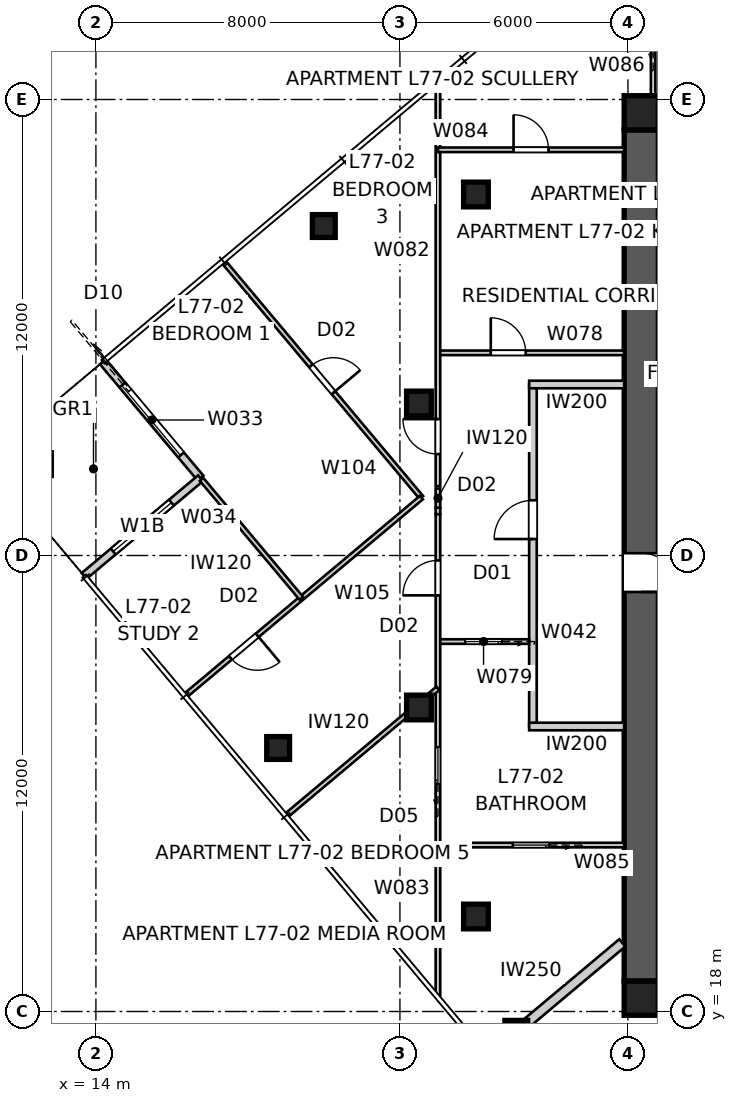
"""IFC4 building model, lengths in metres.
Left out: names, types, materials, properties, quantities, classifications, styles, units other than length and angle.
Written with IfcOpenShell. Run it as: python <this file> out.ifc"""

import sys

from ifc_helpers import new_model, si_unit, direction, frame, frame_2d, origin, origin_2d, place, context, subcontext, project, spatial, polyline, rectangle, outline, extrude, element, fill, save


model = new_model("IFC4")
c1 = context("Model", 3, precision=1e-05, world=origin(), true_north=direction((0.0, 1.0)))
c2 = subcontext(c1, "Body", "Model", "MODEL_VIEW")
j1 = project(units=[si_unit("LENGTHUNIT", "METRE"), si_unit("PLANEANGLEUNIT", "RADIAN")], contexts=[c1])
p1 = place(None, origin())
s1 = spatial("IfcSite", under=j1, at=p1, CompositionType="ELEMENT")
p2 = place(p1, origin())
s2 = spatial("IfcBuilding", under=s1, at=p2, CompositionType="ELEMENT")
p3 = place(p2, frame((0.0, 0.0, 279.4)))
s3 = spatial("IfcBuildingStorey", under=s2, at=p3, CompositionType="ELEMENT", Elevation=279.4)
for number, where, z_axis, x_axis in (
    (1, (28.8, 41.65, 0.0), (0.0, 0.0, 1.0), (1.0, 0.0, 0.0)),
    (2, (51.2, 18.35, 0.0), (0.0, 0.0, 1.0), (-1.0, 0.0, 0.0)),
):
    element("IfcWall", number, at=place(p3, frame(where, z_axis=z_axis, x_axis=x_axis)), inside=s3, PredefinedType="SHEAR", context=c2, shape_type="SweptSolid", body=[
        extrude(outline(polyline([(0.0, -0.45), (22.4, -0.45), (22.4, -0.025), (22.85, -0.025), (22.85, 0.025), (22.4, 0.025), (22.4, 0.45), (0.0, 0.45), (0.0, 0.025), (-0.45, 0.025), (-0.45, -0.025), (0.0, -0.025), (0.0, -0.45)])), origin(), (0.0, 0.0, 1.0), 3.4),
    ])
p4 = place(p3, frame((28.35, 41.2, 0.0), z_axis=(0.0, 0.0, 1.0), x_axis=(0.0, -1.0, 0.0)))
e3 = element("IfcWall", 3, at=p4, inside=s3, PredefinedType="SHEAR", context=c2, shape_type="SweptSolid", body=[
    extrude(outline(polyline([(0.0, -0.45), (22.4, -0.45), (22.4, -0.025), (22.85, -0.025), (22.85, 0.025), (22.4, 0.025), (22.4, 0.45), (0.0, 0.45), (0.0, 0.025), (-0.45, 0.025), (-0.45, -0.025), (0.0, -0.025), (0.0, -0.45)])), origin(), (0.0, 0.0, 1.0), 3.4),
])
p5 = place(p4, frame((11.14, 0.0, 0.0)))
e4 = element("IfcOpeningElement", 4, at=p5, cuts=e3, PredefinedType="OPENING", context=c2, shape_type="SweptSolid", body=[
    extrude(rectangle(XDim=1.02, YDim=2.4, at=frame_2d((0.51, 1.2))), frame((0.0, 0.46, 0.0), z_axis=(0.0, -1.0, 0.0), x_axis=(1.0, 0.0, 0.0)), (0.0, 0.0, 1.0), 0.92),
])
for number, where, z_axis, x_axis in (
    (5, (28.35, 18.35, 0.0), (0.0, 0.0, 1.0), (1.0, 0.0, 0.0)),
    (6, (28.35, 41.65, 0.0), (0.0, 0.0, 1.0), (1.0, 0.0, 0.0)),
):
    element("IfcColumn", number, at=place(p3, frame(where, z_axis=z_axis, x_axis=x_axis)), inside=s3, PredefinedType="COLUMN", context=c2, shape_type="SweptSolid", body=[
        extrude(rectangle(XDim=0.9, YDim=0.9, at=origin_2d()), origin(), (0.0, 0.0, 1.0), 3.4),
    ])
for number, where, z_axis, x_axis in (
    (7, (19.997, 38.671, 0.0), (0.0, 0.0, 1.0), (1.0, 0.0, 0.0)),
    (8, (18.795, 24.935, 0.0), (0.0, 0.0, 1.0), (1.0, 0.0, 0.0)),
    (9, (25.062, 17.466, 0.0), (0.0, 0.0, 1.0), (1.0, 0.0, 0.0)),
):
    element("IfcColumn", number, at=place(p3, frame(where, z_axis=z_axis, x_axis=x_axis)), inside=s3, PredefinedType="COLUMN", context=c2, shape_type="SweptSolid", body=[
        extrude(rectangle(XDim=0.6, YDim=0.6, at=origin_2d()), origin(), (0.0, 0.0, 1.0), 3.4),
    ])
for number, where, z_axis, x_axis in (
    (10, (24.0, 39.5, 0.0), (0.0, 0.0, 1.0), (1.0, 0.0, 0.0)),
    (11, (22.5, 34.0, 0.0), (0.0, 0.0, 1.0), (1.0, 0.0, 0.0)),
    (12, (22.5, 26.0, 0.0), (0.0, 0.0, 1.0), (1.0, 0.0, 0.0)),
    (13, (24.0, 20.5, 0.0), (0.0, 0.0, 1.0), (1.0, 0.0, 0.0)),
):
    element("IfcColumn", number, at=place(p3, frame(where, z_axis=z_axis, x_axis=x_axis)), inside=s3, PredefinedType="COLUMN", context=c2, shape_type="SweptSolid", body=[
        extrude(rectangle(XDim=0.65, YDim=0.65, at=origin_2d()), origin(), (0.0, 0.0, 1.0), 3.4),
    ])
p6 = place(p3, frame((14.183, 35.098, 0.0), z_axis=(0.0, 0.0, 1.0), x_axis=(0.642768287094, -0.766060656284, 0.0)))
e14 = element("IfcWall", 14, at=p6, inside=s3, PredefinedType="SOLIDWALL", context=c2, shape_type="SweptSolid", body=[
    extrude(rectangle(XDim=4.0, YDim=0.2, at=frame_2d((2.0, 0.0))), origin(), (0.0, 0.0, 1.0), 3.25),
])
p7 = place(p6, frame((0.8, 0.0, 0.0)))
e15 = element("IfcOpeningElement", 15, at=p7, cuts=e14, PredefinedType="OPENING", context=c2, shape_type="SweptSolid", body=[
    extrude(rectangle(XDim=2.4, YDim=2.4, at=frame_2d((1.2, 1.2))), frame((0.0, 0.11, 0.0), z_axis=(0.0, -1.0, 0.0), x_axis=(1.0, 0.0, 0.0)), (0.0, 0.0, 1.0), 0.22),
])
p8 = place(p3, frame((16.754, 32.034, 0.0), z_axis=(0.0, 0.0, 1.0), x_axis=(-0.766035437498, -0.642798342015, 0.0)))
e16 = element("IfcWall", 16, at=p8, inside=s3, PredefinedType="SOLIDWALL", context=c2, shape_type="SweptSolid", body=[
    extrude(rectangle(XDim=4.0, YDim=0.2, at=frame_2d((2.0, 0.0))), origin(), (0.0, 0.0, 1.0), 3.25),
])
p9 = place(p8, frame((1.0, 0.0, 0.45)))
e17 = element("IfcOpeningElement", 17, at=p9, cuts=e16, PredefinedType="OPENING", context=c2, shape_type="SweptSolid", body=[
    extrude(rectangle(XDim=2.0, YDim=1.8, at=frame_2d((1.0, 0.9))), frame((0.0, 0.11, 0.0), z_axis=(0.0, -1.0, 0.0), x_axis=(1.0, 0.0, 0.0)), (0.0, 0.0, 1.0), 0.22),
])
p10 = place(p3, frame((25.5, 25.5, 0.0), z_axis=(0.0, 0.0, 1.0), x_axis=(0.0, 1.0, 0.0)))
e18 = element("IfcWall", 18, at=p10, inside=s3, PredefinedType="PARTITIONING", context=c2, shape_type="SweptSolid", body=[
    extrude(rectangle(XDim=9.0, YDim=0.2, at=frame_2d((4.5, 0.0))), origin(), (0.0, 0.0, 1.0), 3.25),
])
p11 = place(p10, frame((4.933, 0.0, 0.0)))
e19 = element("IfcOpeningElement", 19, at=p11, cuts=e18, PredefinedType="OPENING", context=c2, shape_type="SweptSolid", body=[
    extrude(rectangle(XDim=1.02, YDim=2.34, at=frame_2d((0.51, 1.17))), frame((0.0, 0.11, 0.0), z_axis=(0.0, -1.0, 0.0), x_axis=(1.0, 0.0, 0.0)), (0.0, 0.0, 1.0), 0.22),
])
for number, where, z_axis, x_axis in (
    (20, (27.9, 34.5, 0.0), (0.0, 0.0, 1.0), (-1.0, 0.0, 0.0)),
    (21, (27.9, 25.5, 0.0), (0.0, 0.0, 1.0), (-1.0, 0.0, 0.0)),
):
    element("IfcWall", number, at=place(p3, frame(where, z_axis=z_axis, x_axis=x_axis)), inside=s3, PredefinedType="PARTITIONING", context=c2, shape_type="SweptSolid", body=[
        extrude(rectangle(XDim=2.5, YDim=0.2, at=frame_2d((1.25, 0.0))), origin(), (0.0, 0.0, 1.0), 3.25),
    ])
p12 = place(p3, frame((24.296, 16.823, 0.0), z_axis=(0.0, 0.0, 1.0), x_axis=(0.76603440109, 0.64279957712, 0.0)))
e22 = element("IfcWall", 22, at=p12, inside=s3, PredefinedType="PARTITIONING", context=c2, shape_type="SweptSolid", body=[
    extrude(rectangle(XDim=4.64, YDim=0.25, at=frame_2d((2.32, 0.0))), origin(), (0.0, 0.0, 1.0), 3.25),
])
p13 = place(p3, frame((23.0, 35.333, 0.0), z_axis=(0.0, 0.0, 1.0), x_axis=(1.0, 0.0, 0.0)))
e23 = element("IfcWall", 23, at=p13, inside=s3, PredefinedType="PARTITIONING", context=c2, shape_type="SweptSolid", body=[
    extrude(rectangle(XDim=4.9, YDim=0.12, at=frame_2d((2.45, 0.0))), origin(), (0.0, 0.0, 1.0), 3.25),
])
p14 = place(p13, frame((1.39, 0.0, 0.0)))
e24 = element("IfcOpeningElement", 24, at=p14, cuts=e23, PredefinedType="OPENING", context=c2, shape_type="SweptSolid", body=[
    extrude(rectangle(XDim=0.92, YDim=2.34, at=frame_2d((0.46, 1.17))), frame((0.0, 0.07, 0.0), z_axis=(0.0, -1.0, 0.0), x_axis=(1.0, 0.0, 0.0)), (0.0, 0.0, 1.0), 0.14),
])
p15 = place(p3, frame((25.4, 27.736, 0.0), z_axis=(0.0, 0.0, 1.0), x_axis=(-1.0, 0.0, 0.0)))
e25 = element("IfcWall", 25, at=p15, inside=s3, PredefinedType="PARTITIONING", context=c2, shape_type="SweptSolid", body=[
    extrude(rectangle(XDim=2.4, YDim=0.12, at=frame_2d((1.2, 0.0))), origin(), (0.0, 0.0, 1.0), 3.25),
])
p16 = place(p15, frame((0.72, 0.0, 0.0)))
e26 = element("IfcOpeningElement", 26, at=p16, cuts=e25, PredefinedType="OPENING", context=c2, shape_type="SweptSolid", body=[
    extrude(rectangle(XDim=0.96, YDim=2.1, at=frame_2d((0.48, 1.05))), frame((0.0, 0.07, 0.0), z_axis=(0.0, -1.0, 0.0), x_axis=(1.0, 0.0, 0.0)), (0.0, 0.0, 1.0), 0.14),
])
p17 = place(p3, frame((23.0, 31.258, 0.0), z_axis=(0.0, 0.0, 1.0), x_axis=(0.0, 1.0, 0.0)))
e27 = element("IfcWall", 27, at=p17, inside=s3, PredefinedType="PARTITIONING", context=c2, shape_type="SweptSolid", body=[
    extrude(rectangle(XDim=0.504, YDim=0.12, at=frame_2d((0.252, 0.0))), origin(), (0.0, 0.0, 1.0), 3.25),
])
p18 = place(p3, frame((23.0, 31.824, 0.0), z_axis=(0.0, 0.0, 1.0), x_axis=(0.0, 1.0, 0.0)))
e28 = element("IfcWall", 28, at=p18, inside=s3, PredefinedType="PARTITIONING", context=c2, shape_type="SweptSolid", body=[
    extrude(rectangle(XDim=10.619, YDim=0.12, at=frame_2d((5.31, 0.0))), origin(), (0.0, 0.0, 1.0), 2.55),
])
p19 = place(p18, frame((0.844, 0.0, 0.0)))
e29 = element("IfcOpeningElement", 29, at=p19, cuts=e28, PredefinedType="OPENING", context=c2, shape_type="SweptSolid", body=[
    extrude(rectangle(XDim=0.92, YDim=2.34, at=frame_2d((0.46, 1.17))), frame((0.0, 0.07, 0.0), z_axis=(0.0, -1.0, 0.0), x_axis=(1.0, 0.0, 0.0)), (0.0, 0.0, 1.0), 0.14),
])
p20 = place(p3, frame((23.0, 18.43, 0.0), z_axis=(0.0, 0.0, 1.0), x_axis=(0.0, 1.0, 0.0)))
e30 = element("IfcWall", 30, at=p20, inside=s3, PredefinedType="PARTITIONING", context=c2, shape_type="SweptSolid", body=[
    extrude(rectangle(XDim=12.656, YDim=0.12, at=frame_2d((6.328, 0.0))), origin(), (0.0, 0.0, 1.0), 2.55),
])
p21 = place(p20, frame((10.521, 0.0, 0.0)))
e31 = element("IfcOpeningElement", 31, at=p21, cuts=e30, PredefinedType="OPENING", context=c2, shape_type="SweptSolid", body=[
    extrude(rectangle(XDim=0.92, YDim=2.34, at=frame_2d((0.46, 1.17))), frame((0.0, 0.07, 0.0), z_axis=(0.0, -1.0, 0.0), x_axis=(1.0, 0.0, 0.0)), (0.0, 0.0, 1.0), 0.14),
])
p22 = place(p20, frame((5.565, 0.0, 0.0)))
e32 = element("IfcOpeningElement", 32, at=p22, cuts=e30, PredefinedType="OPENING", context=c2, shape_type="SweptSolid", body=[
    extrude(rectangle(XDim=0.96, YDim=2.1, at=frame_2d((0.48, 1.05))), frame((0.0, 0.07, 0.0), z_axis=(0.0, -1.0, 0.0), x_axis=(1.0, 0.0, 0.0)), (0.0, 0.0, 1.0), 0.14),
])
p23 = place(p3, frame((23.0, 40.676, 0.0), z_axis=(0.0, 0.0, 1.0), x_axis=(1.0, 0.0, 0.0)))
e33 = element("IfcWall", 33, at=p23, inside=s3, PredefinedType="PARTITIONING", context=c2, shape_type="SweptSolid", body=[
    extrude(rectangle(XDim=4.9, YDim=0.12, at=frame_2d((2.45, 0.0))), origin(), (0.0, 0.0, 1.0), 3.25),
])
p24 = place(p23, frame((1.99, 0.0, 0.0)))
e34 = element("IfcOpeningElement", 34, at=p24, cuts=e33, PredefinedType="OPENING", context=c2, shape_type="SweptSolid", body=[
    extrude(rectangle(XDim=0.92, YDim=2.1, at=frame_2d((0.46, 1.05))), frame((0.0, 0.07, 0.0), z_axis=(0.0, -1.0, 0.0), x_axis=(1.0, 0.0, 0.0)), (0.0, 0.0, 1.0), 0.14),
])
p25 = place(p3, frame((27.9, 22.38, 0.0), z_axis=(0.0, 0.0, 1.0), x_axis=(-1.0, 0.0, 0.0)))
e35 = element("IfcWall", 35, at=p25, inside=s3, PredefinedType="PARTITIONING", context=c2, shape_type="SweptSolid", body=[
    extrude(rectangle(XDim=4.9, YDim=0.12, at=frame_2d((2.45, 0.0))), origin(), (0.0, 0.0, 1.0), 3.25),
])
p26 = place(p25, frame((1.97, 0.0, 0.0)))
e36 = element("IfcOpeningElement", 36, at=p26, cuts=e35, PredefinedType="OPENING", context=c2, shape_type="SweptSolid", body=[
    extrude(rectangle(XDim=0.96, YDim=2.1, at=frame_2d((0.48, 1.05))), frame((0.0, 0.07, 0.0), z_axis=(0.0, -1.0, 0.0), x_axis=(1.0, 0.0, 0.0)), (0.0, 0.0, 1.0), 0.14),
])
p27 = place(p3, frame((28.663, 41.18, 0.0), z_axis=(0.0, 0.0, 1.0), x_axis=(0.0, 1.0, 0.0)))
e37 = element("IfcWall", 37, at=p27, inside=s3, PredefinedType="PARTITIONING", context=c2, shape_type="SweptSolid", body=[
    extrude(rectangle(XDim=5.82, YDim=0.12, at=frame_2d((2.91, 0.0))), origin(), (0.0, 0.0, 1.0), 3.25),
])
p28 = place(p27, frame((2.44, 0.0, 0.0)))
e38 = element("IfcOpeningElement", 38, at=p28, cuts=e37, PredefinedType="OPENING", context=c2, shape_type="SweptSolid", body=[
    extrude(rectangle(XDim=0.96, YDim=2.1, at=frame_2d((0.48, 1.05))), frame((0.0, 0.07, 0.0), z_axis=(0.0, -1.0, 0.0), x_axis=(1.0, 0.0, 0.0)), (0.0, 0.0, 1.0), 0.14),
])
p29 = place(p3, frame((17.369, 37.719, 0.0), z_axis=(0.0, 0.0, 1.0), x_axis=(0.642800378028, -0.766033729027, 0.0)))
e39 = element("IfcWall", 39, at=p29, inside=s3, PredefinedType="PARTITIONING", context=c2, shape_type="SweptSolid", body=[
    extrude(rectangle(XDim=8.085, YDim=0.12, at=frame_2d((4.042, 0.0))), origin(), (0.0, 0.0, 1.0), 3.25),
])
p30 = place(p29, frame((3.562, 0.0, 0.0)))
e40 = element("IfcOpeningElement", 40, at=p30, cuts=e39, PredefinedType="OPENING", context=c2, shape_type="SweptSolid", body=[
    extrude(rectangle(XDim=0.92, YDim=2.34, at=frame_2d((0.46, 1.17))), frame((0.0, 0.07, 0.0), z_axis=(0.0, -1.0, 0.0), x_axis=(1.0, 0.0, 0.0)), (0.0, 0.0, 1.0), 0.14),
])
p31 = place(p3, frame((22.566, 31.525, 0.0), z_axis=(0.0, 0.0, 1.0), x_axis=(-0.766033729027, -0.642800378028, 0.0)))
e41 = element("IfcWall", 41, at=p31, inside=s3, PredefinedType="PARTITIONING", context=c2, shape_type="SweptSolid", body=[
    extrude(rectangle(XDim=8.085, YDim=0.12, at=frame_2d((4.042, 0.0))), origin(), (0.0, 0.0, 1.0), 3.25),
])
p32 = place(p31, frame((5.64, 0.0, 0.0)))
e42 = element("IfcOpeningElement", 42, at=p32, cuts=e41, PredefinedType="OPENING", context=c2, shape_type="SweptSolid", body=[
    extrude(rectangle(XDim=0.92, YDim=2.34, at=frame_2d((0.46, 1.17))), frame((0.0, 0.07, 0.0), z_axis=(0.0, -1.0, 0.0), x_axis=(1.0, 0.0, 0.0)), (0.0, 0.0, 1.0), 0.14),
])
p33 = place(p3, frame((19.406, 28.874, 0.0), z_axis=(0.0, 0.0, 1.0), x_axis=(-0.642767300664, 0.766061483953, 0.0)))
e43 = element("IfcWall", 43, at=p33, inside=s3, PredefinedType="PARTITIONING", context=c2, shape_type="SweptSolid", body=[
    extrude(rectangle(XDim=4.085, YDim=0.12, at=frame_2d((2.042, 0.0))), origin(), (0.0, 0.0, 1.0), 3.25),
])
p34 = place(p3, frame((23.0, 26.505, 0.0), z_axis=(0.0, 0.0, 1.0), x_axis=(-0.76605407051, -0.642776136034, 0.0)))
e44 = element("IfcWall", 44, at=p34, inside=s3, PredefinedType="PARTITIONING", context=c2, shape_type="SweptSolid", body=[
    extrude(rectangle(XDim=5.191, YDim=0.12, at=frame_2d((2.595, 0.0))), origin(), (0.0, 0.0, 1.0), 3.25),
])
p35 = place(p3, frame((23.0, 31.258, 0.0), z_axis=(0.0, 0.0, 1.0), x_axis=(0.0, -1.0, 0.0)))
e45 = element("IfcWall", 45, at=p35, inside=s3, PredefinedType="PARTITIONING", context=c2, shape_type="SweptSolid", body=[
    extrude(rectangle(XDim=0.172, YDim=0.12, at=frame_2d((0.086, 0.0))), origin(), (0.0, 0.0, 1.0), 3.25),
])
p36 = place(p7, origin())
e46 = element("IfcDoor", 46, at=p36, inside=s3, OperationType="SLIDING_TO_LEFT", PredefinedType="DOOR", context=c2, shape_type="SweptSolid", body=[
    extrude(rectangle(XDim=2.4, YDim=2.4, at=frame_2d((1.2, 1.2))), frame((0.0, 0.025, 0.0), z_axis=(0.0, -1.0, 0.0), x_axis=(1.0, 0.0, 0.0)), (0.0, 0.0, 1.0), 0.05),
])
fill(e15, e46)
p37 = place(p9, origin())
e47 = element("IfcWindow", 47, at=p37, inside=s3, PartitioningType="SINGLE_PANEL", PredefinedType="WINDOW", context=c2, shape_type="SweptSolid", body=[
    extrude(rectangle(XDim=2.0, YDim=1.8, at=frame_2d((1.0, 0.9))), frame((0.0, 0.03, 0.0), z_axis=(0.0, -1.0, 0.0), x_axis=(1.0, 0.0, 0.0)), (0.0, 0.0, 1.0), 0.06),
])
fill(e17, e47)
p38 = place(p11, origin())
e48 = element("IfcDoor", 48, at=p38, inside=s3, OperationType="SINGLE_SWING_LEFT", PredefinedType="DOOR", context=c2, shape_type="SweptSolid", body=[
    extrude(rectangle(XDim=1.02, YDim=2.34, at=frame_2d((0.51, 1.17))), frame((0.0, 0.025, 0.0), z_axis=(0.0, -1.0, 0.0), x_axis=(1.0, 0.0, 0.0)), (0.0, 0.0, 1.0), 0.05),
])
fill(e19, e48)
p39 = place(p14, origin())
e49 = element("IfcDoor", 49, at=p39, inside=s3, OperationType="SINGLE_SWING_LEFT", PredefinedType="DOOR", context=c2, shape_type="SweptSolid", body=[
    extrude(rectangle(XDim=0.92, YDim=2.34, at=frame_2d((0.46, 1.17))), frame((0.0, 0.025, 0.0), z_axis=(0.0, -1.0, 0.0), x_axis=(1.0, 0.0, 0.0)), (0.0, 0.0, 1.0), 0.05),
])
fill(e24, e49)
p40 = place(p19, origin())
e50 = element("IfcDoor", 50, at=p40, inside=s3, OperationType="SINGLE_SWING_RIGHT", PredefinedType="DOOR", context=c2, shape_type="SweptSolid", body=[
    extrude(rectangle(XDim=0.92, YDim=2.34, at=frame_2d((0.46, 1.17))), frame((0.0, 0.025, 0.0), z_axis=(0.0, -1.0, 0.0), x_axis=(1.0, 0.0, 0.0)), (0.0, 0.0, 1.0), 0.05),
])
fill(e29, e50)
p41 = place(p21, origin())
e51 = element("IfcDoor", 51, at=p41, inside=s3, OperationType="SINGLE_SWING_LEFT", PredefinedType="DOOR", context=c2, shape_type="SweptSolid", body=[
    extrude(rectangle(XDim=0.92, YDim=2.34, at=frame_2d((0.46, 1.17))), frame((0.0, 0.025, 0.0), z_axis=(0.0, -1.0, 0.0), x_axis=(1.0, 0.0, 0.0)), (0.0, 0.0, 1.0), 0.05),
])
fill(e31, e51)
p42 = place(p16, origin())
e52 = element("IfcDoor", 52, at=p42, inside=s3, OperationType="SLIDING_TO_LEFT", PredefinedType="DOOR", context=c2, shape_type="SweptSolid", body=[
    extrude(rectangle(XDim=0.96, YDim=2.1, at=frame_2d((0.48, 1.05))), frame((0.0, 0.025, 0.0), z_axis=(0.0, -1.0, 0.0), x_axis=(1.0, 0.0, 0.0)), (0.0, 0.0, 1.0), 0.05),
])
fill(e26, e52)
p43 = place(p24, origin())
e53 = element("IfcDoor", 53, at=p43, inside=s3, OperationType="SINGLE_SWING_LEFT", PredefinedType="DOOR", context=c2, shape_type="SweptSolid", body=[
    extrude(rectangle(XDim=0.92, YDim=2.1, at=frame_2d((0.46, 1.05))), frame((0.0, 0.025, 0.0), z_axis=(0.0, -1.0, 0.0), x_axis=(1.0, 0.0, 0.0)), (0.0, 0.0, 1.0), 0.05),
])
fill(e34, e53)
p44 = place(p26, origin())
e54 = element("IfcDoor", 54, at=p44, inside=s3, OperationType="SLIDING_TO_LEFT", PredefinedType="DOOR", context=c2, shape_type="SweptSolid", body=[
    extrude(rectangle(XDim=0.96, YDim=2.1, at=frame_2d((0.48, 1.05))), frame((0.0, 0.025, 0.0), z_axis=(0.0, -1.0, 0.0), x_axis=(1.0, 0.0, 0.0)), (0.0, 0.0, 1.0), 0.05),
])
fill(e36, e54)
p45 = place(p22, origin())
e55 = element("IfcDoor", 55, at=p45, inside=s3, OperationType="SLIDING_TO_LEFT", PredefinedType="DOOR", context=c2, shape_type="SweptSolid", body=[
    extrude(rectangle(XDim=0.96, YDim=2.1, at=frame_2d((0.48, 1.05))), frame((0.0, 0.025, 0.0), z_axis=(0.0, -1.0, 0.0), x_axis=(1.0, 0.0, 0.0)), (0.0, 0.0, 1.0), 0.05),
])
fill(e32, e55)
p46 = place(p30, origin())
e56 = element("IfcDoor", 56, at=p46, inside=s3, OperationType="SINGLE_SWING_RIGHT", PredefinedType="DOOR", context=c2, shape_type="SweptSolid", body=[
    extrude(rectangle(XDim=0.92, YDim=2.34, at=frame_2d((0.46, 1.17))), frame((0.0, 0.025, 0.0), z_axis=(0.0, -1.0, 0.0), x_axis=(1.0, 0.0, 0.0)), (0.0, 0.0, 1.0), 0.05),
])
fill(e40, e56)
p47 = place(p32, origin())
e57 = element("IfcDoor", 57, at=p47, inside=s3, OperationType="SINGLE_SWING_LEFT", PredefinedType="DOOR", context=c2, shape_type="SweptSolid", body=[
    extrude(rectangle(XDim=0.92, YDim=2.34, at=frame_2d((0.46, 1.17))), frame((0.0, 0.025, 0.0), z_axis=(0.0, -1.0, 0.0), x_axis=(1.0, 0.0, 0.0)), (0.0, 0.0, 1.0), 0.05),
])
fill(e42, e57)
p48 = place(p5, origin())
e58 = element("IfcDoor", 58, at=p48, inside=s3, OperationType="SINGLE_SWING_RIGHT", PredefinedType="DOOR", context=c2, shape_type="SweptSolid", body=[
    extrude(rectangle(XDim=1.02, YDim=2.4, at=frame_2d((0.51, 1.2))), frame((0.0, 0.025, 0.0), z_axis=(0.0, -1.0, 0.0), x_axis=(1.0, 0.0, 0.0)), (0.0, 0.0, 1.0), 0.05),
])
fill(e4, e58)
save(model, sys.argv[1])
